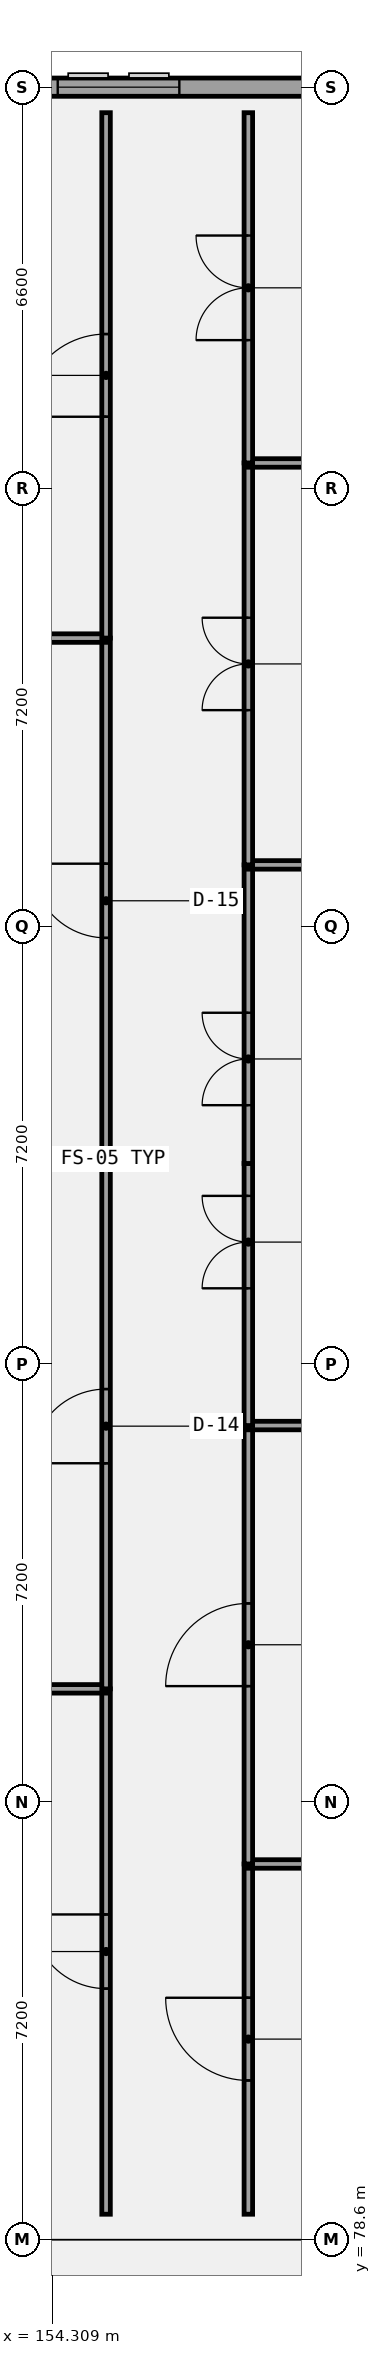
"""IFC4 building model, lengths in metres.
Left out: names, types, materials, properties, quantities, classifications, styles, units other than length and angle.
Written with IfcOpenShell. Run it as: python <this file> out.ifc"""

import sys

from ifc_helpers import new_model, si_unit, direction, frame, frame_2d, origin, place, context, subcontext, project, spatial, rectangle, extrude, element, fill, save


model = new_model("IFC4")
c1 = context("Model", 3, precision=1e-05, world=origin(), true_north=direction((0.0, 1.0)))
c2 = subcontext(c1, "Body", "Model", "MODEL_VIEW")
j1 = project(units=[si_unit("LENGTHUNIT", "METRE"), si_unit("PLANEANGLEUNIT", "RADIAN")], contexts=[c1])
p1 = place(None, origin())
s1 = spatial("IfcSite", under=j1, at=p1, CompositionType="ELEMENT")
p2 = place(p1, origin())
s2 = spatial("IfcBuilding", under=s1, at=p2, CompositionType="ELEMENT")
p3 = place(p2, frame((0.0, 0.0, 18.0)))
s3 = spatial("IfcBuildingStorey", under=s2, at=p3, CompositionType="ELEMENT", Elevation=18.0)
p4 = place(p3, frame((166.35, 114.0, 0.0), z_axis=(0.0, 0.0, 1.0), x_axis=(-1.0, 0.0, 0.0)))
e1 = element("IfcWall", 1, at=p4, inside=s3, PredefinedType="SOLIDWALL", context=c2, shape_type="SweptSolid", body=[
    extrude(rectangle(XDim=21.9, YDim=0.3, at=frame_2d((10.95, 0.0))), origin(), (0.0, 0.0, 1.0), 3.19),
])
p5 = place(p4, frame((17.25, 0.0, 0.95)))
e2 = element("IfcOpeningElement", 2, at=p5, cuts=e1, PredefinedType="OPENING", context=c2, shape_type="SweptSolid", body=[
    extrude(rectangle(XDim=1.8, YDim=1.9, at=frame_2d((0.9, 0.95))), frame((0.0, 0.16, 0.0), z_axis=(0.0, -1.0, 0.0), x_axis=(1.0, 0.0, 0.0)), (0.0, 0.0, 1.0), 0.32),
])
p6 = place(p4, frame((9.95, 0.0, 0.95)))
e3 = element("IfcOpeningElement", 3, at=p6, cuts=e1, PredefinedType="OPENING", context=c2, shape_type="SweptSolid", body=[
    extrude(rectangle(XDim=2.0, YDim=1.4, at=frame_2d((1.0, 0.7))), frame((0.0, 0.16, 0.0), z_axis=(0.0, -1.0, 0.0), x_axis=(1.0, 0.0, 0.0)), (0.0, 0.0, 1.0), 0.32),
])
p7 = place(p4, frame((2.75, 0.0, 0.95)))
e4 = element("IfcOpeningElement", 4, at=p7, cuts=e1, PredefinedType="OPENING", context=c2, shape_type="SweptSolid", body=[
    extrude(rectangle(XDim=2.0, YDim=1.65, at=frame_2d((1.0, 0.825))), frame((0.0, 0.16, 0.0), z_axis=(0.0, -1.0, 0.0), x_axis=(1.0, 0.0, 0.0)), (0.0, 0.0, 1.0), 0.32),
])
p8 = place(p3, frame((155.195, 79.02, 0.0), z_axis=(0.0, 0.0, 1.0), x_axis=(0.0, 1.0, 0.0)))
e5 = element("IfcWall", 5, at=p8, inside=s3, PredefinedType="PARTITIONING", context=c2, shape_type="SweptSolid", body=[
    extrude(rectangle(XDim=8.64, YDim=0.14, at=frame_2d((4.32, 0.0))), origin(), (0.0, 0.0, 1.0), 3.94),
])
p9 = place(p8, frame((3.71, 0.0, 0.0)))
e6 = element("IfcOpeningElement", 6, at=p9, cuts=e5, PredefinedType="OPENING", context=c2, shape_type="SweptSolid", body=[
    extrude(rectangle(XDim=1.22, YDim=2.1, at=frame_2d((0.61, 1.05))), frame((0.0, 0.08, 0.0), z_axis=(0.0, -1.0, 0.0), x_axis=(1.0, 0.0, 0.0)), (0.0, 0.0, 1.0), 0.16),
])
p10 = place(p3, frame((145.25, 87.66, 0.0), z_axis=(0.0, 0.0, 1.0), x_axis=(1.0, 0.0, 0.0)))
e7 = element("IfcWall", 7, at=p10, inside=s3, PredefinedType="PARTITIONING", context=c2, shape_type="SweptSolid", body=[
    extrude(rectangle(XDim=9.945, YDim=0.14, at=frame_2d((4.973, 0.0))), origin(), (0.0, 0.0, 1.0), 3.39),
])
p11 = place(p3, frame((155.195, 87.66, 0.0), z_axis=(0.0, 0.0, 1.0), x_axis=(0.0, 1.0, 0.0)))
e8 = element("IfcWall", 8, at=p11, inside=s3, PredefinedType="PARTITIONING", context=c2, shape_type="SweptSolid", body=[
    extrude(rectangle(XDim=8.64, YDim=0.14, at=frame_2d((4.32, 0.0))), origin(), (0.0, 0.0, 1.0), 3.94),
])
p12 = place(p11, frame((3.71, 0.0, 0.0)))
e9 = element("IfcOpeningElement", 9, at=p12, cuts=e8, PredefinedType="OPENING", context=c2, shape_type="SweptSolid", body=[
    extrude(rectangle(XDim=1.22, YDim=2.22, at=frame_2d((0.61, 1.11))), frame((0.0, 0.08, 0.0), z_axis=(0.0, -1.0, 0.0), x_axis=(1.0, 0.0, 0.0)), (0.0, 0.0, 1.0), 0.16),
])
p13 = place(p3, frame((145.25, 96.3, 0.0), z_axis=(0.0, 0.0, 1.0), x_axis=(1.0, 0.0, 0.0)))
e10 = element("IfcWall", 10, at=p13, inside=s3, PredefinedType="PARTITIONING", context=c2, shape_type="SweptSolid", body=[
    extrude(rectangle(XDim=9.945, YDim=0.14, at=frame_2d((4.973, 0.0))), origin(), (0.0, 0.0, 1.0), 3.94),
])
p14 = place(p3, frame((155.195, 96.3, 0.0), z_axis=(0.0, 0.0, 1.0), x_axis=(0.0, 1.0, 0.0)))
e11 = element("IfcWall", 11, at=p14, inside=s3, PredefinedType="PARTITIONING", context=c2, shape_type="SweptSolid", body=[
    extrude(rectangle(XDim=8.64, YDim=0.14, at=frame_2d((4.32, 0.0))), origin(), (0.0, 0.0, 1.0), 3.94),
])
p15 = place(p14, frame((3.71, 0.0, 0.0)))
e12 = element("IfcOpeningElement", 12, at=p15, cuts=e11, PredefinedType="OPENING", context=c2, shape_type="SweptSolid", body=[
    extrude(rectangle(XDim=1.22, YDim=2.35, at=frame_2d((0.61, 1.175))), frame((0.0, 0.08, 0.0), z_axis=(0.0, -1.0, 0.0), x_axis=(1.0, 0.0, 0.0)), (0.0, 0.0, 1.0), 0.16),
])
p16 = place(p3, frame((145.25, 104.94, 0.0), z_axis=(0.0, 0.0, 1.0), x_axis=(1.0, 0.0, 0.0)))
e13 = element("IfcWall", 13, at=p16, inside=s3, PredefinedType="PARTITIONING", context=c2, shape_type="SweptSolid", body=[
    extrude(rectangle(XDim=9.945, YDim=0.14, at=frame_2d((4.973, 0.0))), origin(), (0.0, 0.0, 1.0), 3.94),
])
p17 = place(p3, frame((155.195, 104.94, 0.0), z_axis=(0.0, 0.0, 1.0), x_axis=(0.0, 1.0, 0.0)))
e14 = element("IfcWall", 14, at=p17, inside=s3, PredefinedType="PARTITIONING", context=c2, shape_type="SweptSolid", body=[
    extrude(rectangle(XDim=8.64, YDim=0.14, at=frame_2d((4.32, 0.0))), origin(), (0.0, 0.0, 1.0), 3.94),
])
p18 = place(p17, frame((3.64, 0.0, 0.0)))
e15 = element("IfcOpeningElement", 15, at=p18, cuts=e14, PredefinedType="OPENING", context=c2, shape_type="SweptSolid", body=[
    extrude(rectangle(XDim=1.36, YDim=2.1, at=frame_2d((0.68, 1.05))), frame((0.0, 0.08, 0.0), z_axis=(0.0, -1.0, 0.0), x_axis=(1.0, 0.0, 0.0)), (0.0, 0.0, 1.0), 0.16),
])
p19 = place(p3, frame((157.535, 79.02, 0.0), z_axis=(0.0, 0.0, 1.0), x_axis=(0.0, 1.0, 0.0)))
e16 = element("IfcWall", 16, at=p19, inside=s3, PredefinedType="PARTITIONING", context=c2, shape_type="SweptSolid", body=[
    extrude(rectangle(XDim=5.76, YDim=0.14, at=frame_2d((2.88, 0.0))), origin(), (0.0, 0.0, 1.0), 3.94),
])
p20 = place(p19, frame((2.2, 0.0, 0.0)))
e17 = element("IfcOpeningElement", 17, at=p20, cuts=e16, PredefinedType="OPENING", context=c2, shape_type="SweptSolid", body=[
    extrude(rectangle(XDim=1.36, YDim=2.22, at=frame_2d((0.68, 1.11))), frame((0.0, 0.08, 0.0), z_axis=(0.0, -1.0, 0.0), x_axis=(1.0, 0.0, 0.0)), (0.0, 0.0, 1.0), 0.16),
])
p21 = place(p3, frame((157.535, 84.78, 0.0), z_axis=(0.0, 0.0, 1.0), x_axis=(1.0, 0.0, 0.0)))
e18 = element("IfcWall", 18, at=p21, inside=s3, PredefinedType="PARTITIONING", context=c2, shape_type="SweptSolid", body=[
    extrude(rectangle(XDim=8.485, YDim=0.14, at=frame_2d((4.243, 0.0))), origin(), (0.0, 0.0, 1.0), 3.94),
])
p22 = place(p3, frame((157.535, 84.78, 0.0), z_axis=(0.0, 0.0, 1.0), x_axis=(0.0, 1.0, 0.0)))
e19 = element("IfcWall", 19, at=p22, inside=s3, PredefinedType="PARTITIONING", context=c2, shape_type="SweptSolid", body=[
    extrude(rectangle(XDim=7.21, YDim=0.14, at=frame_2d((3.605, 0.0))), origin(), (0.0, 0.0, 1.0), 3.94),
])
p23 = place(p22, frame((2.925, 0.0, 0.0)))
e20 = element("IfcOpeningElement", 20, at=p23, cuts=e19, PredefinedType="OPENING", context=c2, shape_type="SweptSolid", body=[
    extrude(rectangle(XDim=1.36, YDim=2.35, at=frame_2d((0.68, 1.175))), frame((0.0, 0.08, 0.0), z_axis=(0.0, -1.0, 0.0), x_axis=(1.0, 0.0, 0.0)), (0.0, 0.0, 1.0), 0.16),
])
p24 = place(p3, frame((157.535, 91.99, 0.0), z_axis=(0.0, 0.0, 1.0), x_axis=(1.0, 0.0, 0.0)))
e21 = element("IfcWall", 21, at=p24, inside=s3, PredefinedType="PARTITIONING", context=c2, shape_type="SweptSolid", body=[
    extrude(rectangle(XDim=8.485, YDim=0.14, at=frame_2d((4.243, 0.0))), origin(), (0.0, 0.0, 1.0), 3.94),
])
p25 = place(p3, frame((157.535, 91.99, 0.0), z_axis=(0.0, 0.0, 1.0), x_axis=(0.0, 1.0, 0.0)))
e22 = element("IfcWall", 22, at=p25, inside=s3, PredefinedType="PARTITIONING", context=c2, shape_type="SweptSolid", body=[
    extrude(rectangle(XDim=4.31, YDim=0.14, at=frame_2d((2.155, 0.0))), origin(), (0.0, 0.0, 1.0), 3.94),
])
p26 = place(p25, frame((2.257, 0.0, 0.0)))
e23 = element("IfcOpeningElement", 23, at=p26, cuts=e22, PredefinedType="OPENING", context=c2, shape_type="SweptSolid", body=[
    extrude(rectangle(XDim=1.52, YDim=2.1, at=frame_2d((0.76, 1.05))), frame((0.0, 0.08, 0.0), z_axis=(0.0, -1.0, 0.0), x_axis=(1.0, 0.0, 0.0)), (0.0, 0.0, 1.0), 0.16),
])
p27 = place(p3, frame((157.535, 96.3, 0.0), z_axis=(0.0, 0.0, 1.0), x_axis=(0.0, 1.0, 0.0)))
e24 = element("IfcWall", 24, at=p27, inside=s3, PredefinedType="PARTITIONING", context=c2, shape_type="SweptSolid", body=[
    extrude(rectangle(XDim=4.91, YDim=0.14, at=frame_2d((2.455, 0.0))), origin(), (0.0, 0.0, 1.0), 3.94),
])
p28 = place(p27, frame((0.958, 0.0, 0.0)))
e25 = element("IfcOpeningElement", 25, at=p28, cuts=e24, PredefinedType="OPENING", context=c2, shape_type="SweptSolid", body=[
    extrude(rectangle(XDim=1.52, YDim=2.22, at=frame_2d((0.76, 1.11))), frame((0.0, 0.08, 0.0), z_axis=(0.0, -1.0, 0.0), x_axis=(1.0, 0.0, 0.0)), (0.0, 0.0, 1.0), 0.16),
])
p29 = place(p3, frame((157.535, 101.21, 0.0), z_axis=(0.0, 0.0, 1.0), x_axis=(1.0, 0.0, 0.0)))
e26 = element("IfcWall", 26, at=p29, inside=s3, PredefinedType="PARTITIONING", context=c2, shape_type="SweptSolid", body=[
    extrude(rectangle(XDim=8.485, YDim=0.14, at=frame_2d((4.243, 0.0))), origin(), (0.0, 0.0, 1.0), 3.94),
])
p30 = place(p3, frame((157.535, 101.21, 0.0), z_axis=(0.0, 0.0, 1.0), x_axis=(0.0, 1.0, 0.0)))
e27 = element("IfcWall", 27, at=p30, inside=s3, PredefinedType="PARTITIONING", context=c2, shape_type="SweptSolid", body=[
    extrude(rectangle(XDim=6.61, YDim=0.14, at=frame_2d((3.305, 0.0))), origin(), (0.0, 0.0, 1.0), 3.94),
])
p31 = place(p30, frame((2.545, 0.0, 0.0)))
e28 = element("IfcOpeningElement", 28, at=p31, cuts=e27, PredefinedType="OPENING", context=c2, shape_type="SweptSolid", body=[
    extrude(rectangle(XDim=1.52, YDim=2.35, at=frame_2d((0.76, 1.175))), frame((0.0, 0.08, 0.0), z_axis=(0.0, -1.0, 0.0), x_axis=(1.0, 0.0, 0.0)), (0.0, 0.0, 1.0), 0.16),
])
p32 = place(p3, frame((157.535, 107.82, 0.0), z_axis=(0.0, 0.0, 1.0), x_axis=(1.0, 0.0, 0.0)))
e29 = element("IfcWall", 29, at=p32, inside=s3, PredefinedType="PARTITIONING", context=c2, shape_type="SweptSolid", body=[
    extrude(rectangle(XDim=8.485, YDim=0.14, at=frame_2d((4.243, 0.0))), origin(), (0.0, 0.0, 1.0), 3.94),
])
p33 = place(p3, frame((157.535, 107.82, 0.0), z_axis=(0.0, 0.0, 1.0), x_axis=(0.0, 1.0, 0.0)))
e30 = element("IfcWall", 30, at=p33, inside=s3, PredefinedType="PARTITIONING", context=c2, shape_type="SweptSolid", body=[
    extrude(rectangle(XDim=5.76, YDim=0.14, at=frame_2d((2.88, 0.0))), origin(), (0.0, 0.0, 1.0), 3.94),
])
p34 = place(p33, frame((2.02, 0.0, 0.0)))
e31 = element("IfcOpeningElement", 31, at=p34, cuts=e30, PredefinedType="OPENING", context=c2, shape_type="SweptSolid", body=[
    extrude(rectangle(XDim=1.72, YDim=2.1, at=frame_2d((0.86, 1.05))), frame((0.0, 0.08, 0.0), z_axis=(0.0, -1.0, 0.0), x_axis=(1.0, 0.0, 0.0)), (0.0, 0.0, 1.0), 0.16),
])
p35 = place(p6, origin())
e32 = element("IfcWindow", 32, at=p35, inside=s3, PartitioningType="SINGLE_PANEL", PredefinedType="WINDOW", context=c2, shape_type="SweptSolid", body=[
    extrude(rectangle(XDim=2.0, YDim=1.4, at=frame_2d((1.0, 0.7))), frame((0.0, 0.03, 0.0), z_axis=(0.0, -1.0, 0.0), x_axis=(1.0, 0.0, 0.0)), (0.0, 0.0, 1.0), 0.06),
])
fill(e3, e32)
p36 = place(p9, frame((1.22, 0.0, 0.0), z_axis=(0.0, 0.0, 1.0), x_axis=(-1.0, 0.0, 0.0)))
e33 = element("IfcDoor", 33, at=p36, inside=s3, OperationType="SINGLE_SWING_RIGHT", PredefinedType="DOOR", context=c2, shape_type="SweptSolid", body=[
    extrude(rectangle(XDim=1.22, YDim=2.1, at=frame_2d((0.61, 1.05))), frame((0.0, 0.025, 0.0), z_axis=(0.0, -1.0, 0.0), x_axis=(1.0, 0.0, 0.0)), (0.0, 0.0, 1.0), 0.05),
])
fill(e6, e33)
p37 = place(p12, frame((1.22, 0.0, 0.0), z_axis=(0.0, 0.0, 1.0), x_axis=(-1.0, 0.0, 0.0)))
e34 = element("IfcDoor", 34, at=p37, inside=s3, OperationType="SINGLE_SWING_LEFT", PredefinedType="DOOR", context=c2, shape_type="SweptSolid", body=[
    extrude(rectangle(XDim=1.22, YDim=2.22, at=frame_2d((0.61, 1.11))), frame((0.0, 0.025, 0.0), z_axis=(0.0, -1.0, 0.0), x_axis=(1.0, 0.0, 0.0)), (0.0, 0.0, 1.0), 0.05),
])
fill(e9, e34)
p38 = place(p15, frame((1.22, 0.0, 0.0), z_axis=(0.0, 0.0, 1.0), x_axis=(-1.0, 0.0, 0.0)))
e35 = element("IfcDoor", 35, at=p38, inside=s3, OperationType="SINGLE_SWING_RIGHT", PredefinedType="DOOR", context=c2, shape_type="SweptSolid", body=[
    extrude(rectangle(XDim=1.22, YDim=2.35, at=frame_2d((0.61, 1.175))), frame((0.0, 0.025, 0.0), z_axis=(0.0, -1.0, 0.0), x_axis=(1.0, 0.0, 0.0)), (0.0, 0.0, 1.0), 0.05),
])
fill(e12, e35)
p39 = place(p18, frame((1.36, 0.0, 0.0), z_axis=(0.0, 0.0, 1.0), x_axis=(-1.0, 0.0, 0.0)))
e36 = element("IfcDoor", 36, at=p39, inside=s3, OperationType="SINGLE_SWING_LEFT", PredefinedType="DOOR", context=c2, shape_type="SweptSolid", body=[
    extrude(rectangle(XDim=1.36, YDim=2.1, at=frame_2d((0.68, 1.05))), frame((0.0, 0.025, 0.0), z_axis=(0.0, -1.0, 0.0), x_axis=(1.0, 0.0, 0.0)), (0.0, 0.0, 1.0), 0.05),
])
fill(e15, e36)
p40 = place(p20, origin())
e37 = element("IfcDoor", 37, at=p40, inside=s3, OperationType="SINGLE_SWING_RIGHT", PredefinedType="DOOR", context=c2, shape_type="SweptSolid", body=[
    extrude(rectangle(XDim=1.36, YDim=2.22, at=frame_2d((0.68, 1.11))), frame((0.0, 0.025, 0.0), z_axis=(0.0, -1.0, 0.0), x_axis=(1.0, 0.0, 0.0)), (0.0, 0.0, 1.0), 0.05),
])
fill(e17, e37)
p41 = place(p23, origin())
e38 = element("IfcDoor", 38, at=p41, inside=s3, OperationType="SINGLE_SWING_LEFT", PredefinedType="DOOR", context=c2, shape_type="SweptSolid", body=[
    extrude(rectangle(XDim=1.36, YDim=2.35, at=frame_2d((0.68, 1.175))), frame((0.0, 0.025, 0.0), z_axis=(0.0, -1.0, 0.0), x_axis=(1.0, 0.0, 0.0)), (0.0, 0.0, 1.0), 0.05),
])
fill(e20, e38)
p42 = place(p26, origin())
e39 = element("IfcDoor", 39, at=p42, inside=s3, OperationType="DOUBLE_DOOR_SINGLE_SWING", PredefinedType="DOOR", context=c2, shape_type="SweptSolid", body=[
    extrude(rectangle(XDim=1.52, YDim=2.1, at=frame_2d((0.76, 1.05))), frame((0.0, 0.025, 0.0), z_axis=(0.0, -1.0, 0.0), x_axis=(1.0, 0.0, 0.0)), (0.0, 0.0, 1.0), 0.05),
])
fill(e23, e39)
p43 = place(p28, origin())
e40 = element("IfcDoor", 40, at=p43, inside=s3, OperationType="DOUBLE_DOOR_SINGLE_SWING", PredefinedType="DOOR", context=c2, shape_type="SweptSolid", body=[
    extrude(rectangle(XDim=1.52, YDim=2.22, at=frame_2d((0.76, 1.11))), frame((0.0, 0.025, 0.0), z_axis=(0.0, -1.0, 0.0), x_axis=(1.0, 0.0, 0.0)), (0.0, 0.0, 1.0), 0.05),
])
fill(e25, e40)
p44 = place(p31, origin())
e41 = element("IfcDoor", 41, at=p44, inside=s3, OperationType="DOUBLE_DOOR_SINGLE_SWING", PredefinedType="DOOR", context=c2, shape_type="SweptSolid", body=[
    extrude(rectangle(XDim=1.52, YDim=2.35, at=frame_2d((0.76, 1.175))), frame((0.0, 0.025, 0.0), z_axis=(0.0, -1.0, 0.0), x_axis=(1.0, 0.0, 0.0)), (0.0, 0.0, 1.0), 0.05),
])
fill(e28, e41)
p45 = place(p34, origin())
e42 = element("IfcDoor", 42, at=p45, inside=s3, OperationType="DOUBLE_DOOR_SINGLE_SWING", PredefinedType="DOOR", context=c2, shape_type="SweptSolid", body=[
    extrude(rectangle(XDim=1.72, YDim=2.1, at=frame_2d((0.86, 1.05))), frame((0.0, 0.025, 0.0), z_axis=(0.0, -1.0, 0.0), x_axis=(1.0, 0.0, 0.0)), (0.0, 0.0, 1.0), 0.05),
])
fill(e31, e42)
save(model, sys.argv[1])
